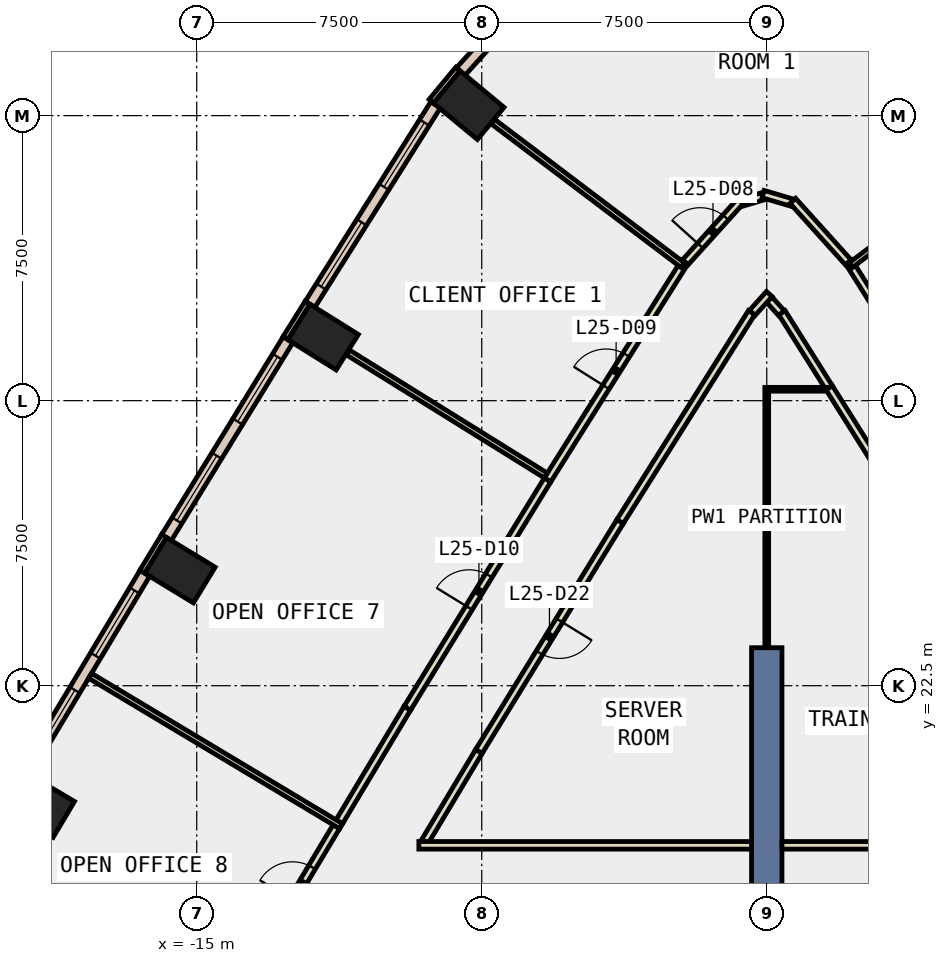
"""IFC4 building model, lengths in metres.
Left out: names, types, materials, properties, quantities, classifications, styles, units other than length and angle.
Written with IfcOpenShell. Run it as: python <this file> out.ifc"""

import sys

from ifc_helpers import new_model, si_unit, direction, frame, frame_2d, origin, origin_2d, place, context, subcontext, project, spatial, rectangle, extrude, element, fill, save


model = new_model("IFC4")
c1 = context("Model", 3, precision=1e-05, world=origin(), true_north=direction((0.0, 1.0)))
c2 = subcontext(c1, "Body", "Model", "MODEL_VIEW")
j1 = project(units=[si_unit("LENGTHUNIT", "METRE"), si_unit("PLANEANGLEUNIT", "RADIAN")], contexts=[c1])
p1 = place(None, origin())
s1 = spatial("IfcSite", under=j1, at=p1, CompositionType="ELEMENT")
p2 = place(p1, origin())
s2 = spatial("IfcBuilding", under=s1, at=p2, CompositionType="ELEMENT")
p3 = place(p2, frame((0.0, 0.0, 116.0)))
s3 = spatial("IfcBuildingStorey", under=s2, at=p3, CompositionType="ELEMENT", Elevation=116.0)
for number, where, z_axis, x_axis in (
    (1, (-7.842, 37.774, -0.4), (0.0, 0.0, 1.0), (0.638, 0.77, 0.0)),
    (2, (-11.675, 31.673, -0.4), (0.0, 0.0, 1.0), (0.53, 0.848, 0.0)),
    (3, (-15.442, 25.539, -0.4), (0.0, 0.0, 1.0), (0.52, 0.854, 0.0)),
    (4, (-19.143, 19.364, -0.4), (0.0, 0.0, 1.0), (0.51, 0.86, 0.0)),
):
    element("IfcColumn", number, at=place(p3, frame(where, z_axis=z_axis, x_axis=x_axis)), inside=s3, PredefinedType="COLUMN", context=c2, shape_type="SweptSolid", body=[
        extrude(rectangle(XDim=1.1, YDim=1.5, at=origin_2d()), origin(), (0.0, 0.0, 1.0), 4.2),
    ])
p4 = place(p3, frame((0.0, 14.5, -0.4), z_axis=(0.0, 0.0, 1.0), x_axis=(0.0, 1.0, 0.0)))
e5 = element("IfcWall", 5, at=p4, inside=s3, PredefinedType="SHEAR", context=c2, shape_type="SweptSolid", body=[
    extrude(rectangle(XDim=9.0, YDim=0.8, at=frame_2d((4.5, 0.0))), origin(), (0.0, 0.0, 1.0), 4.2),
])
p5 = place(p3, frame((-8.126, 38.724, 0.0), z_axis=(0.0, 0.0, 1.0), x_axis=(-0.638435351024, -0.769675452748, 0.0)))
e6 = element("IfcWall", 6, at=p5, inside=s3, PredefinedType="STANDARD", context=c2, shape_type="SweptSolid", body=[
    extrude(rectangle(XDim=1.099, YDim=0.15, at=frame_2d((0.55, 0.0))), origin(), (0.0, 0.0, 1.0), 3.8),
])
p6 = place(p3, frame((-12.083, 32.577, 0.0), z_axis=(0.0, 0.0, 1.0), x_axis=(-0.52997899071, -0.848010771987, 0.0)))
e7 = element("IfcWall", 7, at=p6, inside=s3, PredefinedType="STANDARD", context=c2, shape_type="SweptSolid", body=[
    extrude(rectangle(XDim=1.1, YDim=0.15, at=frame_2d((0.55, 0.0))), origin(), (0.0, 0.0, 1.0), 3.8),
])
p7 = place(p3, frame((-15.861, 26.438, 0.0), z_axis=(0.0, 0.0, 1.0), x_axis=(-0.519869515594, -0.854245682901, 0.0)))
e8 = element("IfcWall", 8, at=p7, inside=s3, PredefinedType="STANDARD", context=c2, shape_type="SweptSolid", body=[
    extrude(rectangle(XDim=1.1, YDim=0.15, at=frame_2d((0.55, 0.0))), origin(), (0.0, 0.0, 1.0), 3.8),
])
p8 = place(p3, frame((-5.445, 41.552, 0.0), z_axis=(0.0, 0.0, 1.0), x_axis=(-0.66966434159, -0.742663900834, 0.0)))
e9 = element("IfcWall", 9, at=p8, inside=s3, PredefinedType="STANDARD", context=c2, shape_type="SweptSolid", body=[
    extrude(rectangle(XDim=3.893, YDim=0.3, at=frame_2d((1.946, 0.0))), origin(), (0.0, 0.0, 1.0), 3.8),
])
p9 = place(p8, frame((1.246, 0.0, 0.9)))
e10 = element("IfcOpeningElement", 10, at=p9, cuts=e9, PredefinedType="OPENING", context=c2, shape_type="SweptSolid", body=[
    extrude(rectangle(XDim=1.4, YDim=2.6, at=frame_2d((0.7, 1.3))), frame((0.0, 0.16, 0.0), z_axis=(0.0, -1.0, 0.0), x_axis=(1.0, 0.0, 0.0)), (0.0, 0.0, 1.0), 0.32),
])
p10 = place(p3, frame((-8.714, 37.784, 0.0), z_axis=(0.0, 0.0, 1.0), x_axis=(-0.532699467907, -0.846304482377, 0.0)))
e11 = element("IfcWall", 11, at=p10, inside=s3, PredefinedType="STANDARD", context=c2, shape_type="SweptSolid", body=[
    extrude(rectangle(XDim=6.202, YDim=0.3, at=frame_2d((3.101, 0.0))), origin(), (0.0, 0.0, 1.0), 3.8),
])
p11 = place(p10, frame((0.551, 0.0, 0.9)))
e12 = element("IfcOpeningElement", 12, at=p11, cuts=e11, PredefinedType="OPENING", context=c2, shape_type="SweptSolid", body=[
    extrude(rectangle(XDim=2.0, YDim=2.6, at=frame_2d((1.0, 1.3))), frame((0.0, 0.16, 0.0), z_axis=(0.0, -1.0, 0.0), x_axis=(1.0, 0.0, 0.0)), (0.0, 0.0, 1.0), 0.32),
])
p12 = place(p10, frame((3.652, 0.0, 0.9)))
e13 = element("IfcOpeningElement", 13, at=p12, cuts=e11, PredefinedType="OPENING", context=c2, shape_type="SweptSolid", body=[
    extrude(rectangle(XDim=2.0, YDim=2.6, at=frame_2d((1.0, 1.3))), frame((0.0, 0.16, 0.0), z_axis=(0.0, -1.0, 0.0), x_axis=(1.0, 0.0, 0.0)), (0.0, 0.0, 1.0), 0.32),
])
p13 = place(p3, frame((-12.598, 31.603, 0.0), z_axis=(0.0, 0.0, 1.0), x_axis=(-0.523417276981, -0.852076495485, 0.0)))
e14 = element("IfcWall", 14, at=p13, inside=s3, PredefinedType="STANDARD", context=c2, shape_type="SweptSolid", body=[
    extrude(rectangle(XDim=6.11, YDim=0.3, at=frame_2d((3.055, 0.0))), origin(), (0.0, 0.0, 1.0), 3.8),
])
p14 = place(p13, frame((0.527, 0.0, 0.9)))
e15 = element("IfcOpeningElement", 15, at=p14, cuts=e14, PredefinedType="OPENING", context=c2, shape_type="SweptSolid", body=[
    extrude(rectangle(XDim=2.0, YDim=2.6, at=frame_2d((1.0, 1.3))), frame((0.0, 0.16, 0.0), z_axis=(0.0, -1.0, 0.0), x_axis=(1.0, 0.0, 0.0)), (0.0, 0.0, 1.0), 0.32),
])
p15 = place(p13, frame((3.582, 0.0, 0.9)))
e16 = element("IfcOpeningElement", 16, at=p15, cuts=e14, PredefinedType="OPENING", context=c2, shape_type="SweptSolid", body=[
    extrude(rectangle(XDim=2.0, YDim=2.6, at=frame_2d((1.0, 1.3))), frame((0.0, 0.16, 0.0), z_axis=(0.0, -1.0, 0.0), x_axis=(1.0, 0.0, 0.0)), (0.0, 0.0, 1.0), 0.32),
])
p16 = place(p3, frame((-16.365, 25.458, 0.0), z_axis=(0.0, 0.0, 1.0), x_axis=(-0.514078503149, -0.857743139057, 0.0)))
e17 = element("IfcWall", 17, at=p16, inside=s3, PredefinedType="STANDARD", context=c2, shape_type="SweptSolid", body=[
    extrude(rectangle(XDim=6.11, YDim=0.3, at=frame_2d((3.055, 0.0))), origin(), (0.0, 0.0, 1.0), 3.8),
])
p17 = place(p16, frame((0.528, 0.0, 0.9)))
e18 = element("IfcOpeningElement", 18, at=p17, cuts=e17, PredefinedType="OPENING", context=c2, shape_type="SweptSolid", body=[
    extrude(rectangle(XDim=2.0, YDim=2.6, at=frame_2d((1.0, 1.3))), frame((0.0, 0.16, 0.0), z_axis=(0.0, -1.0, 0.0), x_axis=(1.0, 0.0, 0.0)), (0.0, 0.0, 1.0), 0.32),
])
p18 = place(p16, frame((3.583, 0.0, 0.9)))
e19 = element("IfcOpeningElement", 19, at=p18, cuts=e17, PredefinedType="OPENING", context=c2, shape_type="SweptSolid", body=[
    extrude(rectangle(XDim=2.0, YDim=2.6, at=frame_2d((1.0, 1.3))), frame((0.0, 0.16, 0.0), z_axis=(0.0, -1.0, 0.0), x_axis=(1.0, 0.0, 0.0)), (0.0, 0.0, 1.0), 0.32),
])
p19 = place(p3, frame((3.861, 26.816, 0.0), z_axis=(0.0, 0.0, 1.0), x_axis=(-0.532782188792, 0.846252408745, 0.0)))
e20 = element("IfcWall", 20, at=p19, inside=s3, PredefinedType="PARTITIONING", context=c2, shape_type="SweptSolid", body=[
    extrude(rectangle(XDim=4.167, YDim=0.2, at=frame_2d((2.083, 0.0))), origin(), (0.0, 0.0, 1.0), 3.8),
])
p20 = place(p3, frame((1.641, 30.342, 0.0), z_axis=(0.0, 0.0, 1.0), x_axis=(-0.532732797088, 0.846283502679, 0.0)))
e21 = element("IfcWall", 21, at=p20, inside=s3, PredefinedType="PARTITIONING", context=c2, shape_type="SweptSolid", body=[
    extrude(rectangle(XDim=2.333, YDim=0.2, at=frame_2d((1.167, 0.0))), origin(), (0.0, 0.0, 1.0), 3.8),
])
p21 = place(p3, frame((0.384, 32.306, 0.0), z_axis=(0.0, 0.0, 1.0), x_axis=(-0.669306261406, 0.742986627365, 0.0)))
e22 = element("IfcWall", 22, at=p21, inside=s3, PredefinedType="PARTITIONING", context=c2, shape_type="SweptSolid", body=[
    extrude(rectangle(XDim=0.474, YDim=0.2, at=frame_2d((0.237, 0.0))), origin(), (0.0, 0.0, 1.0), 3.8),
])
p22 = place(p3, frame((0.067, 32.807, 0.0), z_axis=(0.0, 0.0, 1.0), x_axis=(-0.66900475403, -0.74325812413, 0.0)))
e23 = element("IfcWall", 23, at=p22, inside=s3, PredefinedType="PARTITIONING", context=c2, shape_type="SweptSolid", body=[
    extrude(rectangle(XDim=0.674, YDim=0.2, at=frame_2d((0.337, 0.0))), origin(), (0.0, 0.0, 1.0), 3.8),
])
p23 = place(p3, frame((-0.398, 32.317, 0.0), z_axis=(0.0, 0.0, 1.0), x_axis=(-0.53276445777, -0.846263571553, 0.0)))
e24 = element("IfcWall", 24, at=p23, inside=s3, PredefinedType="PARTITIONING", context=c2, shape_type="SweptSolid", body=[
    extrude(rectangle(XDim=6.5, YDim=0.2, at=frame_2d((3.25, 0.0))), origin(), (0.0, 0.0, 1.0), 3.8),
])
p24 = place(p3, frame((-3.861, 26.816, 0.0), z_axis=(0.0, 0.0, 1.0), x_axis=(-0.523390991338, -0.852092641786, 0.0)))
e25 = element("IfcWall", 25, at=p24, inside=s3, PredefinedType="PARTITIONING", context=c2, shape_type="SweptSolid", body=[
    extrude(rectangle(XDim=7.098, YDim=0.2, at=frame_2d((3.549, 0.0))), origin(), (0.0, 0.0, 1.0), 3.8),
])
p25 = place(p24, frame((3.049, 0.0, 0.0)))
e26 = element("IfcOpeningElement", 26, at=p25, cuts=e25, PredefinedType="OPENING", context=c2, shape_type="SweptSolid", body=[
    extrude(rectangle(XDim=1.0, YDim=2.1, at=frame_2d((0.5, 1.05))), frame((0.0, 0.11, 0.0), z_axis=(0.0, -1.0, 0.0), x_axis=(1.0, 0.0, 0.0)), (0.0, 0.0, 1.0), 0.22),
])
p26 = place(p3, frame((-7.576, 20.768, 0.0), z_axis=(0.0, 0.0, 1.0), x_axis=(-0.513900868925, -0.857849577092, 0.0)))
e27 = element("IfcWall", 27, at=p26, inside=s3, PredefinedType="PARTITIONING", context=c2, shape_type="SweptSolid", body=[
    extrude(rectangle(XDim=2.777, YDim=0.2, at=frame_2d((1.388, 0.0))), origin(), (0.0, 0.0, 1.0), 3.8),
])
p27 = place(p3, frame((2.159, 33.649, 0.0), z_axis=(0.0, 0.0, 1.0), x_axis=(0.532784927572, -0.846250684462, 0.0)))
e28 = element("IfcWall", 28, at=p27, inside=s3, PredefinedType="PARTITIONING", context=c2, shape_type="SweptSolid", body=[
    extrude(rectangle(XDim=6.626, YDim=0.2, at=frame_2d((3.313, 0.0))), origin(), (0.0, 0.0, 1.0), 3.8),
])
p28 = place(p27, frame((2.888, 0.0, 0.0)))
e29 = element("IfcOpeningElement", 29, at=p28, cuts=e28, PredefinedType="OPENING", context=c2, shape_type="SweptSolid", body=[
    extrude(rectangle(XDim=1.0, YDim=2.1, at=frame_2d((0.5, 1.05))), frame((0.0, 0.11, 0.0), z_axis=(0.0, -1.0, 0.0), x_axis=(1.0, 0.0, 0.0)), (0.0, 0.0, 1.0), 0.22),
])
p29 = place(p3, frame((-2.145, 33.639, 0.0), z_axis=(0.0, 0.0, 1.0), x_axis=(0.66965737341, 0.742670184023, 0.0)))
e30 = element("IfcWall", 30, at=p29, inside=s3, PredefinedType="PARTITIONING", context=c2, shape_type="SweptSolid", body=[
    extrude(rectangle(XDim=2.18, YDim=0.2, at=frame_2d((1.09, 0.0))), origin(), (0.0, 0.0, 1.0), 3.8),
])
p30 = place(p29, frame((0.59, 0.0, 0.0)))
e31 = element("IfcOpeningElement", 31, at=p30, cuts=e30, PredefinedType="OPENING", context=c2, shape_type="SweptSolid", body=[
    extrude(rectangle(XDim=1.0, YDim=2.1, at=frame_2d((0.5, 1.05))), frame((0.0, 0.11, 0.0), z_axis=(0.0, -1.0, 0.0), x_axis=(1.0, 0.0, 0.0)), (0.0, 0.0, 1.0), 0.22),
])
p31 = place(p3, frame((-0.656, 35.213, 0.0), z_axis=(0.0, 0.0, 1.0), x_axis=(0.958764375257, 0.284202168777, 0.0)))
e32 = element("IfcWall", 32, at=p31, inside=s3, PredefinedType="PARTITIONING", context=c2, shape_type="SweptSolid", body=[
    extrude(rectangle(XDim=0.584, YDim=0.2, at=frame_2d((0.292, 0.0))), origin(), (0.0, 0.0, 1.0), 3.8),
])
p32 = place(p3, frame((-0.096, 35.436, 0.0), z_axis=(0.0, 0.0, 1.0), x_axis=(0.95867870552, -0.284491018456, 0.0)))
e33 = element("IfcWall", 33, at=p32, inside=s3, PredefinedType="PARTITIONING", context=c2, shape_type="SweptSolid", body=[
    extrude(rectangle(XDim=0.784, YDim=0.2, at=frame_2d((0.392, 0.0))), origin(), (0.0, 0.0, 1.0), 3.8),
])
p33 = place(p3, frame((0.685, 35.258, 0.0), z_axis=(0.0, 0.0, 1.0), x_axis=(0.66965737341, -0.742670184023, 0.0)))
e34 = element("IfcWall", 34, at=p33, inside=s3, PredefinedType="PARTITIONING", context=c2, shape_type="SweptSolid", body=[
    extrude(rectangle(XDim=2.18, YDim=0.2, at=frame_2d((1.09, 0.0))), origin(), (0.0, 0.0, 1.0), 3.8),
])
p34 = place(p3, frame((-5.769, 27.915, 0.0), z_axis=(0.0, 0.0, 1.0), x_axis=(0.532800846123, 0.846240662206, 0.0)))
e35 = element("IfcWall", 35, at=p34, inside=s3, PredefinedType="PARTITIONING", context=c2, shape_type="SweptSolid", body=[
    extrude(rectangle(XDim=6.776, YDim=0.2, at=frame_2d((3.388, 0.0))), origin(), (0.0, 0.0, 1.0), 3.8),
])
p35 = place(p34, frame((2.888, 0.0, 0.0)))
e36 = element("IfcOpeningElement", 36, at=p35, cuts=e35, PredefinedType="OPENING", context=c2, shape_type="SweptSolid", body=[
    extrude(rectangle(XDim=1.0, YDim=2.1, at=frame_2d((0.5, 1.05))), frame((0.0, 0.11, 0.0), z_axis=(0.0, -1.0, 0.0), x_axis=(1.0, 0.0, 0.0)), (0.0, 0.0, 1.0), 0.22),
])
p36 = place(p3, frame((-11.249, 18.918, 0.0), z_axis=(0.0, 0.0, 1.0), x_axis=(0.513949903813, 0.857820200491, 0.0)))
e37 = element("IfcWall", 37, at=p36, inside=s3, PredefinedType="PARTITIONING", context=c2, shape_type="SweptSolid", body=[
    extrude(rectangle(XDim=3.487, YDim=0.2, at=frame_2d((1.743, 0.0))), origin(), (0.0, 0.0, 1.0), 3.8),
])
p37 = place(p3, frame((-9.457, 21.909, 0.0), z_axis=(0.0, 0.0, 1.0), x_axis=(0.523366731761, 0.852107542559, 0.0)))
e38 = element("IfcWall", 38, at=p37, inside=s3, PredefinedType="PARTITIONING", context=c2, shape_type="SweptSolid", body=[
    extrude(rectangle(XDim=7.049, YDim=0.2, at=frame_2d((3.524, 0.0))), origin(), (0.0, 0.0, 1.0), 3.8),
])
p38 = place(p37, frame((3.099, 0.0, 0.0)))
e39 = element("IfcOpeningElement", 39, at=p38, cuts=e38, PredefinedType="OPENING", context=c2, shape_type="SweptSolid", body=[
    extrude(rectangle(XDim=1.0, YDim=2.1, at=frame_2d((0.5, 1.05))), frame((0.0, 0.11, 0.0), z_axis=(0.0, -1.0, 0.0), x_axis=(1.0, 0.0, 0.0)), (0.0, 0.0, 1.0), 0.22),
])
p39 = place(p3, frame((-13.119, 15.799, 0.0), z_axis=(0.0, 0.0, 1.0), x_axis=(0.514155958966, 0.857696712049, 0.0)))
e40 = element("IfcWall", 40, at=p39, inside=s3, PredefinedType="PARTITIONING", context=c2, shape_type="SweptSolid", body=[
    extrude(rectangle(XDim=3.487, YDim=0.2, at=frame_2d((1.744, 0.0))), origin(), (0.0, 0.0, 1.0), 3.8),
])
p40 = place(p39, frame((1.244, 0.0, 0.0)))
e41 = element("IfcOpeningElement", 41, at=p40, cuts=e40, PredefinedType="OPENING", context=c2, shape_type="SweptSolid", body=[
    extrude(rectangle(XDim=1.0, YDim=2.1, at=frame_2d((0.5, 1.05))), frame((0.0, 0.11, 0.0), z_axis=(0.0, -1.0, 0.0), x_axis=(1.0, 0.0, 0.0)), (0.0, 0.0, 1.0), 0.22),
])
for number, where, z_axis, x_axis in (
    (42, (0.4, 18.3, 0.0), (0.0, 0.0, 1.0), (1.0, 0.0, 0.0)),
    (43, (-9.155, 18.3, 0.0), (0.0, 0.0, 1.0), (1.0, 0.0, 0.0)),
):
    element("IfcWall", number, at=place(p3, frame(where, z_axis=z_axis, x_axis=x_axis)), inside=s3, PredefinedType="PARTITIONING", context=c2, shape_type="SweptSolid", body=[
        extrude(rectangle(XDim=8.755, YDim=0.2, at=frame_2d((4.377, 0.0))), origin(), (0.0, 0.0, 1.0), 3.8),
    ])
p41 = place(p3, frame((0.0, 23.5, 0.0), z_axis=(0.0, 0.0, 1.0), x_axis=(0.0, 1.0, 0.0)))
e44 = element("IfcWall", 44, at=p41, inside=s3, PredefinedType="PARTITIONING", context=c2, shape_type="SweptSolid", body=[
    extrude(rectangle(XDim=6.85, YDim=0.1, at=frame_2d((3.425, 0.0))), origin(), (0.0, 0.0, 1.0), 3.8),
])
p42 = place(p3, frame((0.05, 30.3, 0.0), z_axis=(0.0, 0.0, 1.0), x_axis=(1.0, 0.0, 0.0)))
e45 = element("IfcWall", 45, at=p42, inside=s3, PredefinedType="PARTITIONING", context=c2, shape_type="SweptSolid", body=[
    extrude(rectangle(XDim=1.518, YDim=0.1, at=frame_2d((0.759, 0.0))), origin(), (0.0, 0.0, 1.0), 3.8),
])
for number, where, z_axis, x_axis in (
    (46, (2.212, 33.565, 0.0), (0.0, 0.0, 1.0), (0.797, 0.603, 0.0)),
    (47, (-2.212, 33.565, 0.0), (0.0, 0.0, 1.0), (-0.797, 0.603, 0.0)),
):
    element("IfcWall", number, at=place(p3, frame(where, z_axis=z_axis, x_axis=x_axis)), inside=s3, PredefinedType="PARTITIONING", context=c2, shape_type="SweptSolid", body=[
        extrude(rectangle(XDim=6.257, YDim=0.15, at=frame_2d((3.128, 0.0))), origin(), (0.0, 0.0, 1.0), 3.8),
    ])
p43 = place(p3, frame((-5.814, 28.031, 0.0), z_axis=(0.0, 0.0, 1.0), x_axis=(-0.849222099047, 0.528035819324, 0.0)))
e48 = element("IfcWall", 48, at=p43, inside=s3, PredefinedType="PARTITIONING", context=c2, shape_type="SweptSolid", body=[
    extrude(rectangle(XDim=6.13, YDim=0.15, at=frame_2d((3.065, 0.0))), origin(), (0.0, 0.0, 1.0), 3.8),
])
p44 = place(p3, frame((-11.202, 18.803, 0.0), z_axis=(0.0, 0.0, 1.0), x_axis=(-0.857778149162, 0.514020084062, 0.0)))
e49 = element("IfcWall", 49, at=p44, inside=s3, PredefinedType="PARTITIONING", context=c2, shape_type="SweptSolid", body=[
    extrude(rectangle(XDim=7.7, YDim=0.15, at=frame_2d((3.85, 0.0))), origin(), (0.0, 0.0, 1.0), 3.8),
])
p45 = place(p11, origin())
e50 = element("IfcWindow", 50, at=p45, inside=s3, PartitioningType="SINGLE_PANEL", PredefinedType="WINDOW", context=c2, shape_type="SweptSolid", body=[
    extrude(rectangle(XDim=2.0, YDim=2.6, at=frame_2d((1.0, 1.3))), frame((0.0, 0.03, 0.0), z_axis=(0.0, -1.0, 0.0), x_axis=(1.0, 0.0, 0.0)), (0.0, 0.0, 1.0), 0.06),
])
fill(e12, e50)
p46 = place(p12, origin())
e51 = element("IfcWindow", 51, at=p46, inside=s3, PartitioningType="SINGLE_PANEL", PredefinedType="WINDOW", context=c2, shape_type="SweptSolid", body=[
    extrude(rectangle(XDim=2.0, YDim=2.6, at=frame_2d((1.0, 1.3))), frame((0.0, 0.03, 0.0), z_axis=(0.0, -1.0, 0.0), x_axis=(1.0, 0.0, 0.0)), (0.0, 0.0, 1.0), 0.06),
])
fill(e13, e51)
p47 = place(p14, origin())
e52 = element("IfcWindow", 52, at=p47, inside=s3, PartitioningType="SINGLE_PANEL", PredefinedType="WINDOW", context=c2, shape_type="SweptSolid", body=[
    extrude(rectangle(XDim=2.0, YDim=2.6, at=frame_2d((1.0, 1.3))), frame((0.0, 0.03, 0.0), z_axis=(0.0, -1.0, 0.0), x_axis=(1.0, 0.0, 0.0)), (0.0, 0.0, 1.0), 0.06),
])
fill(e15, e52)
p48 = place(p15, origin())
e53 = element("IfcWindow", 53, at=p48, inside=s3, PartitioningType="SINGLE_PANEL", PredefinedType="WINDOW", context=c2, shape_type="SweptSolid", body=[
    extrude(rectangle(XDim=2.0, YDim=2.6, at=frame_2d((1.0, 1.3))), frame((0.0, 0.03, 0.0), z_axis=(0.0, -1.0, 0.0), x_axis=(1.0, 0.0, 0.0)), (0.0, 0.0, 1.0), 0.06),
])
fill(e16, e53)
p49 = place(p17, origin())
e54 = element("IfcWindow", 54, at=p49, inside=s3, PartitioningType="SINGLE_PANEL", PredefinedType="WINDOW", context=c2, shape_type="SweptSolid", body=[
    extrude(rectangle(XDim=2.0, YDim=2.6, at=frame_2d((1.0, 1.3))), frame((0.0, 0.03, 0.0), z_axis=(0.0, -1.0, 0.0), x_axis=(1.0, 0.0, 0.0)), (0.0, 0.0, 1.0), 0.06),
])
fill(e18, e54)
p50 = place(p18, origin())
e55 = element("IfcWindow", 55, at=p50, inside=s3, PartitioningType="SINGLE_PANEL", PredefinedType="WINDOW", context=c2, shape_type="SweptSolid", body=[
    extrude(rectangle(XDim=2.0, YDim=2.6, at=frame_2d((1.0, 1.3))), frame((0.0, 0.03, 0.0), z_axis=(0.0, -1.0, 0.0), x_axis=(1.0, 0.0, 0.0)), (0.0, 0.0, 1.0), 0.06),
])
fill(e19, e55)
p51 = place(p30, origin())
e56 = element("IfcDoor", 56, at=p51, inside=s3, OperationType="SINGLE_SWING_LEFT", PredefinedType="DOOR", context=c2, shape_type="SweptSolid", body=[
    extrude(rectangle(XDim=1.0, YDim=2.1, at=frame_2d((0.5, 1.05))), frame((0.0, 0.025, 0.0), z_axis=(0.0, -1.0, 0.0), x_axis=(1.0, 0.0, 0.0)), (0.0, 0.0, 1.0), 0.05),
])
fill(e31, e56)
p52 = place(p35, origin())
e57 = element("IfcDoor", 57, at=p52, inside=s3, OperationType="SINGLE_SWING_LEFT", PredefinedType="DOOR", context=c2, shape_type="SweptSolid", body=[
    extrude(rectangle(XDim=1.0, YDim=2.1, at=frame_2d((0.5, 1.05))), frame((0.0, 0.025, 0.0), z_axis=(0.0, -1.0, 0.0), x_axis=(1.0, 0.0, 0.0)), (0.0, 0.0, 1.0), 0.05),
])
fill(e36, e57)
p53 = place(p38, origin())
e58 = element("IfcDoor", 58, at=p53, inside=s3, OperationType="SINGLE_SWING_LEFT", PredefinedType="DOOR", context=c2, shape_type="SweptSolid", body=[
    extrude(rectangle(XDim=1.0, YDim=2.1, at=frame_2d((0.5, 1.05))), frame((0.0, 0.025, 0.0), z_axis=(0.0, -1.0, 0.0), x_axis=(1.0, 0.0, 0.0)), (0.0, 0.0, 1.0), 0.05),
])
fill(e39, e58)
p54 = place(p40, origin())
e59 = element("IfcDoor", 59, at=p54, inside=s3, OperationType="SINGLE_SWING_LEFT", PredefinedType="DOOR", context=c2, shape_type="SweptSolid", body=[
    extrude(rectangle(XDim=1.0, YDim=2.1, at=frame_2d((0.5, 1.05))), frame((0.0, 0.025, 0.0), z_axis=(0.0, -1.0, 0.0), x_axis=(1.0, 0.0, 0.0)), (0.0, 0.0, 1.0), 0.05),
])
fill(e41, e59)
p55 = place(p25, origin())
e60 = element("IfcDoor", 60, at=p55, inside=s3, OperationType="SINGLE_SWING_LEFT", PredefinedType="DOOR", context=c2, shape_type="SweptSolid", body=[
    extrude(rectangle(XDim=1.0, YDim=2.1, at=frame_2d((0.5, 1.05))), frame((0.0, 0.025, 0.0), z_axis=(0.0, -1.0, 0.0), x_axis=(1.0, 0.0, 0.0)), (0.0, 0.0, 1.0), 0.05),
])
fill(e26, e60)
save(model, sys.argv[1])
